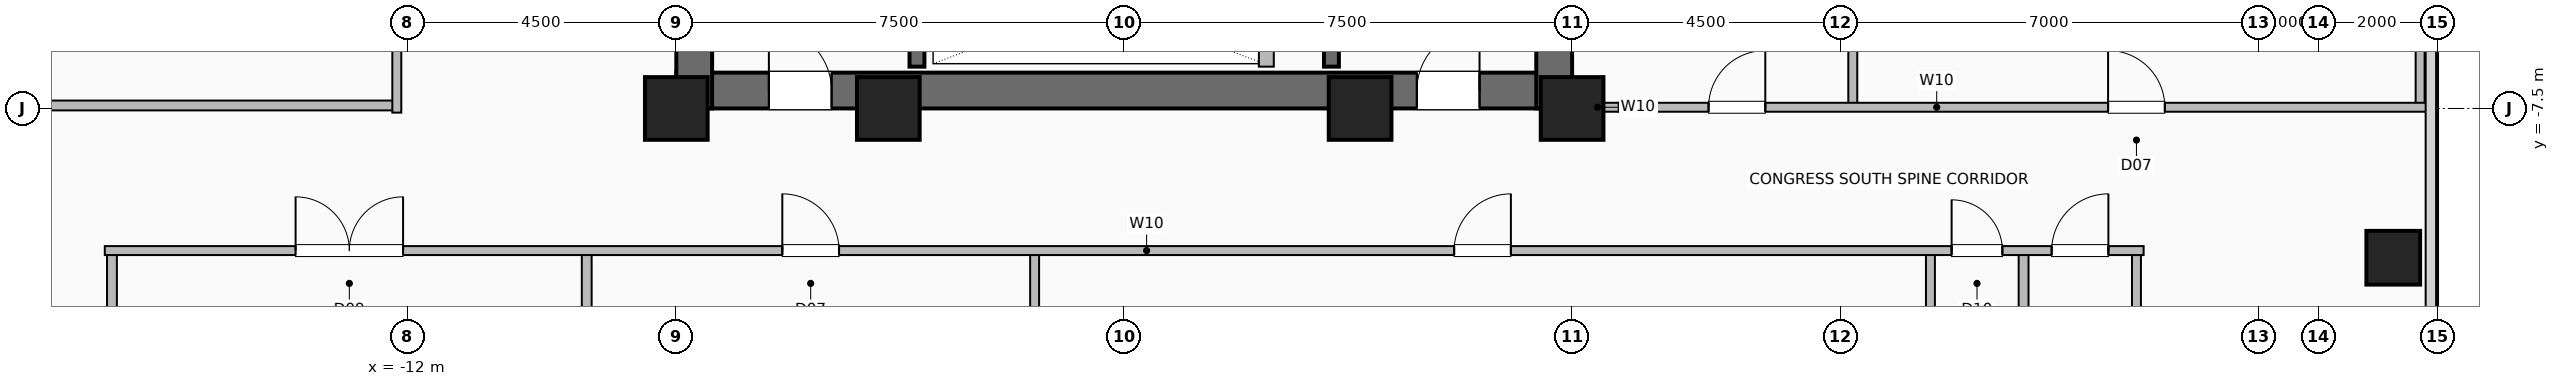
"""IFC4 building model, lengths in metres.
Left out: names, types, materials, properties, quantities, classifications, styles, units other than length and angle.
Written with IfcOpenShell. Run it as: python <this file> out.ifc"""

import sys

from ifc_helpers import new_model, si_unit, direction, frame, frame_2d, origin, origin_2d, place, context, subcontext, project, spatial, rectangle, hollow_rectangle, extrude, element, fill, save


model = new_model("IFC4")
c1 = context("Model", 3, precision=1e-05, world=origin(), true_north=direction((0.0, 1.0)))
c2 = subcontext(c1, "Body", "Model", "MODEL_VIEW")
j1 = project(units=[si_unit("LENGTHUNIT", "METRE"), si_unit("PLANEANGLEUNIT", "RADIAN")], contexts=[c1])
p1 = place(None, origin())
s1 = spatial("IfcSite", under=j1, at=p1, CompositionType="ELEMENT")
p2 = place(p1, origin())
s2 = spatial("IfcBuilding", under=s1, at=p2, CompositionType="ELEMENT")
p3 = place(p2, frame((0.0, 0.0, 97.6)))
s3 = spatial("IfcBuildingStorey", under=s2, at=p3, CompositionType="ELEMENT", Elevation=97.6)
for number, where, z_axis, x_axis in (
    (1, (-7.5, -7.5, 0.0), (0.0, 0.0, 1.0), (1.0, 0.0, 0.0)),
    (2, (-3.95, -7.5, 0.0), (0.0, 0.0, 1.0), (1.0, 0.0, 0.0)),
    (3, (3.95, -7.5, 0.0), (0.0, 0.0, 1.0), (1.0, 0.0, 0.0)),
    (4, (7.5, -7.5, 0.0), (0.0, 0.0, 1.0), (1.0, 0.0, 0.0)),
):
    element("IfcColumn", number, at=place(p3, frame(where, z_axis=z_axis, x_axis=x_axis)), inside=s3, PredefinedType="COLUMN", context=c2, shape_type="SweptSolid", body=[
        extrude(hollow_rectangle(XDim=1.05, YDim=1.05, WallThickness=0.05, at=origin_2d()), origin(), (0.0, 0.0, 1.0), 3.6),
    ])
p4 = place(p3, frame((21.25, -10.0, 0.0), z_axis=(0.0, 0.0, 1.0), x_axis=(1.0, 0.0, 0.0)))
e5 = element("IfcColumn", 5, at=p4, inside=s3, PredefinedType="COLUMN", context=c2, shape_type="SweptSolid", body=[
    extrude(hollow_rectangle(XDim=0.9, YDim=0.9, WallThickness=0.045, at=origin_2d()), origin(), (0.0, 0.0, 1.0), 3.6),
])
p5 = place(p3, frame((-7.5, -7.2, 0.0), z_axis=(0.0, 0.0, 1.0), x_axis=(1.0, 0.0, 0.0)))
e6 = element("IfcWall", 6, at=p5, inside=s3, PredefinedType="SHEAR", context=c2, shape_type="SweptSolid", body=[
    extrude(rectangle(XDim=15.0, YDim=0.6, at=frame_2d((7.5, 0.0))), origin(), (0.0, 0.0, 1.0), 3.36),
])
p6 = place(p5, frame((1.55, 0.0, 0.0)))
e7 = element("IfcOpeningElement", 7, at=p6, cuts=e6, PredefinedType="OPENING", context=c2, shape_type="SweptSolid", body=[
    extrude(rectangle(XDim=1.05, YDim=2.08, at=frame_2d((0.525, 1.04))), frame((0.0, 0.31, 0.0), z_axis=(0.0, -1.0, 0.0), x_axis=(1.0, 0.0, 0.0)), (0.0, 0.0, 1.0), 0.62),
])
p7 = place(p5, frame((12.4, 0.0, 0.0)))
e8 = element("IfcOpeningElement", 8, at=p7, cuts=e6, PredefinedType="OPENING", context=c2, shape_type="SweptSolid", body=[
    extrude(rectangle(XDim=1.05, YDim=2.08, at=frame_2d((0.525, 1.04))), frame((0.0, 0.31, 0.0), z_axis=(0.0, -1.0, 0.0), x_axis=(1.0, 0.0, 0.0)), (0.0, 0.0, 1.0), 0.62),
])
p8 = place(p3, frame((-7.2, -7.5, 0.0), z_axis=(0.0, 0.0, 1.0), x_axis=(0.0, 1.0, 0.0)))
e9 = element("IfcWall", 9, at=p8, inside=s3, PredefinedType="SHEAR", context=c2, shape_type="SweptSolid", body=[
    extrude(rectangle(XDim=15.0, YDim=0.6, at=frame_2d((7.5, 0.0))), origin(), (0.0, 0.0, 1.0), 3.36),
])
p9 = place(p8, frame((9.5, 0.0, 0.0)))
e10 = element("IfcOpeningElement", 10, at=p9, cuts=e9, PredefinedType="OPENING", context=c2, shape_type="SweptSolid", body=[
    extrude(rectangle(XDim=1.0, YDim=2.08, at=frame_2d((0.5, 1.04))), frame((0.0, 0.31, 0.0), z_axis=(0.0, -1.0, 0.0), x_axis=(1.0, 0.0, 0.0)), (0.0, 0.0, 1.0), 0.62),
])
p10 = place(p3, frame((7.2, -7.5, 0.0), z_axis=(0.0, 0.0, 1.0), x_axis=(0.0, 1.0, 0.0)))
e11 = element("IfcWall", 11, at=p10, inside=s3, PredefinedType="SHEAR", context=c2, shape_type="SweptSolid", body=[
    extrude(rectangle(XDim=15.0, YDim=0.6, at=frame_2d((7.5, 0.0))), origin(), (0.0, 0.0, 1.0), 3.36),
])
for number, where, z_axis, x_axis in (
    (12, (-3.47, -6.8, 0.0), (0.0, 0.0, 1.0), (0.0, 1.0, 0.0)),
    (13, (3.47, -6.8, 0.0), (0.0, 0.0, 1.0), (0.0, 1.0, 0.0)),
):
    element("IfcWall", number, at=place(p3, frame(where, z_axis=z_axis, x_axis=x_axis)), inside=s3, PredefinedType="SHEAR", context=c2, shape_type="SweptSolid", body=[
        extrude(rectangle(XDim=7.72, YDim=0.25, at=frame_2d((3.86, 0.0))), origin(), (0.0, 0.0, 1.0), 3.36),
    ])
p11 = place(p3, frame((2.38, -6.8, 0.0), z_axis=(0.0, 0.0, 1.0), x_axis=(0.0, 1.0, 0.0)))
e14 = element("IfcWall", 14, at=p11, inside=s3, PredefinedType="SHEAR", context=c2, shape_type="SweptSolid", body=[
    extrude(rectangle(XDim=2.22, YDim=0.25, at=frame_2d((1.11, 0.0))), origin(), (0.0, 0.0, 1.0), 3.36),
])
for number, where, z_axis, x_axis in (
    (15, (15.06, -21.82, 0.0), (0.0, 0.0, 1.0), (0.0, 1.0, 0.0)),
    (16, (-16.95, -21.82, 0.0), (0.0, 0.0, 1.0), (0.0, 1.0, 0.0)),
    (17, (-9.0, -21.82, 0.0), (0.0, 0.0, 1.0), (0.0, 1.0, 0.0)),
):
    element("IfcWall", number, at=place(p3, frame(where, z_axis=z_axis, x_axis=x_axis)), inside=s3, PredefinedType="PLUMBINGWALL", context=c2, shape_type="SweptSolid", body=[
        extrude(rectangle(XDim=11.94, YDim=0.165, at=frame_2d((5.97, 0.0))), origin(), (0.0, 0.0, 1.0), 3.36),
    ])
for number, where, z_axis, x_axis in (
    (18, (-1.5, -21.82, 0.0), (0.0, 0.0, 1.0), (0.0, 1.0, 0.0)),
    (19, (13.5, -21.82, 0.0), (0.0, 0.0, 1.0), (0.0, 1.0, 0.0)),
    (20, (16.95, -21.82, 0.0), (0.0, 0.0, 1.0), (0.0, 1.0, 0.0)),
):
    element("IfcWall", number, at=place(p3, frame(where, z_axis=z_axis, x_axis=x_axis)), inside=s3, PredefinedType="PARTITIONING", context=c2, shape_type="SweptSolid", body=[
        extrude(rectangle(XDim=11.94, YDim=0.15, at=frame_2d((5.97, 0.0))), origin(), (0.0, 0.0, 1.0), 3.36),
    ])
p12 = place(p3, frame((-17.07, -9.88, 0.0), z_axis=(0.0, 0.0, 1.0), x_axis=(1.0, 0.0, 0.0)))
e21 = element("IfcWall", 21, at=p12, inside=s3, PredefinedType="PARTITIONING", context=c2, shape_type="SweptSolid", body=[
    extrude(rectangle(XDim=34.14, YDim=0.15, at=frame_2d((17.07, 0.0))), origin(), (0.0, 0.0, 1.0), 3.36),
])
p13 = place(p12, frame((3.195, 0.0, 0.0)))
e22 = element("IfcOpeningElement", 22, at=p13, cuts=e21, PredefinedType="OPENING", context=c2, shape_type="SweptSolid", body=[
    extrude(rectangle(XDim=1.8, YDim=2.08, at=frame_2d((0.9, 1.04))), frame((0.0, 0.085, 0.0), z_axis=(0.0, -1.0, 0.0), x_axis=(1.0, 0.0, 0.0)), (0.0, 0.0, 1.0), 0.17),
])
p14 = place(p12, frame((11.345, 0.0, 0.0)))
e23 = element("IfcOpeningElement", 23, at=p14, cuts=e21, PredefinedType="OPENING", context=c2, shape_type="SweptSolid", body=[
    extrude(rectangle(XDim=0.95, YDim=2.06, at=frame_2d((0.475, 1.03))), frame((0.0, 0.085, 0.0), z_axis=(0.0, -1.0, 0.0), x_axis=(1.0, 0.0, 0.0)), (0.0, 0.0, 1.0), 0.17),
])
p15 = place(p12, frame((22.595, 0.0, 0.0)))
e24 = element("IfcOpeningElement", 24, at=p15, cuts=e21, PredefinedType="OPENING", context=c2, shape_type="SweptSolid", body=[
    extrude(rectangle(XDim=0.95, YDim=2.06, at=frame_2d((0.475, 1.03))), frame((0.0, 0.085, 0.0), z_axis=(0.0, -1.0, 0.0), x_axis=(1.0, 0.0, 0.0)), (0.0, 0.0, 1.0), 0.17),
])
p16 = place(p12, frame((30.925, 0.0, 0.0)))
e25 = element("IfcOpeningElement", 25, at=p16, cuts=e21, PredefinedType="OPENING", context=c2, shape_type="SweptSolid", body=[
    extrude(rectangle(XDim=0.85, YDim=2.05, at=frame_2d((0.425, 1.025))), frame((0.0, 0.085, 0.0), z_axis=(0.0, -1.0, 0.0), x_axis=(1.0, 0.0, 0.0)), (0.0, 0.0, 1.0), 0.17),
])
p17 = place(p12, frame((32.6, 0.0, 0.0)))
e26 = element("IfcOpeningElement", 26, at=p17, cuts=e21, PredefinedType="OPENING", context=c2, shape_type="SweptSolid", body=[
    extrude(rectangle(XDim=0.95, YDim=2.06, at=frame_2d((0.475, 1.03))), frame((0.0, 0.085, 0.0), z_axis=(0.0, -1.0, 0.0), x_axis=(1.0, 0.0, 0.0)), (0.0, 0.0, 1.0), 0.17),
])
p18 = place(p3, frame((-21.82, -7.45, 0.0), z_axis=(0.0, 0.0, 1.0), x_axis=(1.0, 0.0, 0.0)))
e27 = element("IfcWall", 27, at=p18, inside=s3, PredefinedType="PLUMBINGWALL", context=c2, shape_type="SweptSolid", body=[
    extrude(rectangle(XDim=9.64, YDim=0.165, at=frame_2d((4.82, 0.0))), origin(), (0.0, 0.0, 1.0), 3.36),
])
p19 = place(p3, frame((-12.18, -7.57, 0.0), z_axis=(0.0, 0.0, 1.0), x_axis=(0.0, 1.0, 0.0)))
e28 = element("IfcWall", 28, at=p19, inside=s3, PredefinedType="PARTITIONING", context=c2, shape_type="SweptSolid", body=[
    extrude(rectangle(XDim=15.14, YDim=0.15, at=frame_2d((7.57, 0.0))), origin(), (0.0, 0.0, 1.0), 3.36),
])
p20 = place(p19, frame((2.62, 0.0, 0.0)))
e29 = element("IfcOpeningElement", 29, at=p20, cuts=e28, PredefinedType="OPENING", context=c2, shape_type="SweptSolid", body=[
    extrude(rectangle(XDim=0.95, YDim=2.06, at=frame_2d((0.475, 1.03))), frame((0.0, 0.085, 0.0), z_axis=(0.0, -1.0, 0.0), x_axis=(1.0, 0.0, 0.0)), (0.0, 0.0, 1.0), 0.17),
])
p21 = place(p19, frame((8.845, 0.0, 0.0)))
e30 = element("IfcOpeningElement", 30, at=p21, cuts=e28, PredefinedType="OPENING", context=c2, shape_type="SweptSolid", body=[
    extrude(rectangle(XDim=0.95, YDim=2.06, at=frame_2d((0.475, 1.03))), frame((0.0, 0.085, 0.0), z_axis=(0.0, -1.0, 0.0), x_axis=(1.0, 0.0, 0.0)), (0.0, 0.0, 1.0), 0.17),
])
p22 = place(p19, frame((13.37, 0.0, 0.0)))
e31 = element("IfcOpeningElement", 31, at=p22, cuts=e28, PredefinedType="OPENING", context=c2, shape_type="SweptSolid", body=[
    extrude(rectangle(XDim=0.85, YDim=2.05, at=frame_2d((0.425, 1.025))), frame((0.0, 0.085, 0.0), z_axis=(0.0, -1.0, 0.0), x_axis=(1.0, 0.0, 0.0)), (0.0, 0.0, 1.0), 0.17),
])
p23 = place(p3, frame((7.45, -7.48, 0.0), z_axis=(0.0, 0.0, 1.0), x_axis=(1.0, 0.0, 0.0)))
e32 = element("IfcWall", 32, at=p23, inside=s3, PredefinedType="PARTITIONING", context=c2, shape_type="SweptSolid", body=[
    extrude(rectangle(XDim=0.95, YDim=0.15, at=frame_2d((0.475, 0.0))), origin(), (0.0, 0.0, 1.0), 3.36),
])
for number, where, z_axis, x_axis in (
    (33, (12.2, -7.48, 0.0), (0.0, 0.0, 1.0), (0.0, 1.0, 0.0)),
    (34, (21.7, -7.48, 0.0), (0.0, 0.0, 1.0), (0.0, 1.0, 0.0)),
):
    element("IfcWall", number, at=place(p3, frame(where, z_axis=z_axis, x_axis=x_axis)), inside=s3, PredefinedType="PARTITIONING", context=c2, shape_type="SweptSolid", body=[
        extrude(rectangle(XDim=14.88, YDim=0.15, at=frame_2d((7.44, 0.0))), origin(), (0.0, 0.0, 1.0), 3.36),
    ])
p24 = place(p3, frame((8.28, -7.48, 0.0), z_axis=(0.0, 0.0, 1.0), x_axis=(1.0, 0.0, 0.0)))
e35 = element("IfcWall", 35, at=p24, inside=s3, PredefinedType="PARTITIONING", context=c2, shape_type="SweptSolid", body=[
    extrude(rectangle(XDim=13.54, YDim=0.15, at=frame_2d((6.77, 0.0))), origin(), (0.0, 0.0, 1.0), 3.36),
])
p25 = place(p24, frame((1.505, 0.0, 0.0)))
e36 = element("IfcOpeningElement", 36, at=p25, cuts=e35, PredefinedType="OPENING", context=c2, shape_type="SweptSolid", body=[
    extrude(rectangle(XDim=0.95, YDim=2.06, at=frame_2d((0.475, 1.03))), frame((0.0, 0.085, 0.0), z_axis=(0.0, -1.0, 0.0), x_axis=(1.0, 0.0, 0.0)), (0.0, 0.0, 1.0), 0.17),
])
p26 = place(p24, frame((8.195, 0.0, 0.0)))
e37 = element("IfcOpeningElement", 37, at=p26, cuts=e35, PredefinedType="OPENING", context=c2, shape_type="SweptSolid", body=[
    extrude(rectangle(XDim=0.95, YDim=2.06, at=frame_2d((0.475, 1.03))), frame((0.0, 0.085, 0.0), z_axis=(0.0, -1.0, 0.0), x_axis=(1.0, 0.0, 0.0)), (0.0, 0.0, 1.0), 0.17),
])
p27 = place(p6, origin())
e38 = element("IfcDoor", 38, at=p27, inside=s3, OperationType="SINGLE_SWING_LEFT", PredefinedType="DOOR", context=c2, shape_type="SweptSolid", body=[
    extrude(rectangle(XDim=1.05, YDim=2.08, at=frame_2d((0.525, 1.04))), frame((0.0, 0.025, 0.0), z_axis=(0.0, -1.0, 0.0), x_axis=(1.0, 0.0, 0.0)), (0.0, 0.0, 1.0), 0.05),
])
fill(e7, e38)
p28 = place(p7, origin())
e39 = element("IfcDoor", 39, at=p28, inside=s3, OperationType="SINGLE_SWING_RIGHT", PredefinedType="DOOR", context=c2, shape_type="SweptSolid", body=[
    extrude(rectangle(XDim=1.05, YDim=2.08, at=frame_2d((0.525, 1.04))), frame((0.0, 0.025, 0.0), z_axis=(0.0, -1.0, 0.0), x_axis=(1.0, 0.0, 0.0)), (0.0, 0.0, 1.0), 0.05),
])
fill(e8, e39)
p29 = place(p13, origin())
e40 = element("IfcDoor", 40, at=p29, inside=s3, OperationType="DOUBLE_DOOR_SINGLE_SWING", PredefinedType="DOOR", context=c2, shape_type="SweptSolid", body=[
    extrude(rectangle(XDim=1.8, YDim=2.08, at=frame_2d((0.9, 1.04))), frame((0.0, 0.025, 0.0), z_axis=(0.0, -1.0, 0.0), x_axis=(1.0, 0.0, 0.0)), (0.0, 0.0, 1.0), 0.05),
])
fill(e22, e40)
p30 = place(p14, origin())
e41 = element("IfcDoor", 41, at=p30, inside=s3, OperationType="SINGLE_SWING_LEFT", PredefinedType="DOOR", context=c2, shape_type="SweptSolid", body=[
    extrude(rectangle(XDim=0.95, YDim=2.06, at=frame_2d((0.475, 1.03))), frame((0.0, 0.025, 0.0), z_axis=(0.0, -1.0, 0.0), x_axis=(1.0, 0.0, 0.0)), (0.0, 0.0, 1.0), 0.05),
])
fill(e23, e41)
p31 = place(p15, origin())
e42 = element("IfcDoor", 42, at=p31, inside=s3, OperationType="SINGLE_SWING_RIGHT", PredefinedType="DOOR", context=c2, shape_type="SweptSolid", body=[
    extrude(rectangle(XDim=0.95, YDim=2.06, at=frame_2d((0.475, 1.03))), frame((0.0, 0.025, 0.0), z_axis=(0.0, -1.0, 0.0), x_axis=(1.0, 0.0, 0.0)), (0.0, 0.0, 1.0), 0.05),
])
fill(e24, e42)
p32 = place(p16, origin())
e43 = element("IfcDoor", 43, at=p32, inside=s3, OperationType="SINGLE_SWING_LEFT", PredefinedType="DOOR", context=c2, shape_type="SweptSolid", body=[
    extrude(rectangle(XDim=0.85, YDim=2.05, at=frame_2d((0.425, 1.025))), frame((0.0, 0.025, 0.0), z_axis=(0.0, -1.0, 0.0), x_axis=(1.0, 0.0, 0.0)), (0.0, 0.0, 1.0), 0.05),
])
fill(e25, e43)
p33 = place(p17, origin())
e44 = element("IfcDoor", 44, at=p33, inside=s3, OperationType="SINGLE_SWING_RIGHT", PredefinedType="DOOR", context=c2, shape_type="SweptSolid", body=[
    extrude(rectangle(XDim=0.95, YDim=2.06, at=frame_2d((0.475, 1.03))), frame((0.0, 0.025, 0.0), z_axis=(0.0, -1.0, 0.0), x_axis=(1.0, 0.0, 0.0)), (0.0, 0.0, 1.0), 0.05),
])
fill(e26, e44)
p34 = place(p25, origin())
e45 = element("IfcDoor", 45, at=p34, inside=s3, OperationType="SINGLE_SWING_RIGHT", PredefinedType="DOOR", context=c2, shape_type="SweptSolid", body=[
    extrude(rectangle(XDim=0.95, YDim=2.06, at=frame_2d((0.475, 1.03))), frame((0.0, 0.025, 0.0), z_axis=(0.0, -1.0, 0.0), x_axis=(1.0, 0.0, 0.0)), (0.0, 0.0, 1.0), 0.05),
])
fill(e36, e45)
p35 = place(p26, origin())
e46 = element("IfcDoor", 46, at=p35, inside=s3, OperationType="SINGLE_SWING_LEFT", PredefinedType="DOOR", context=c2, shape_type="SweptSolid", body=[
    extrude(rectangle(XDim=0.95, YDim=2.06, at=frame_2d((0.475, 1.03))), frame((0.0, 0.025, 0.0), z_axis=(0.0, -1.0, 0.0), x_axis=(1.0, 0.0, 0.0)), (0.0, 0.0, 1.0), 0.05),
])
fill(e37, e46)
save(model, sys.argv[1])
